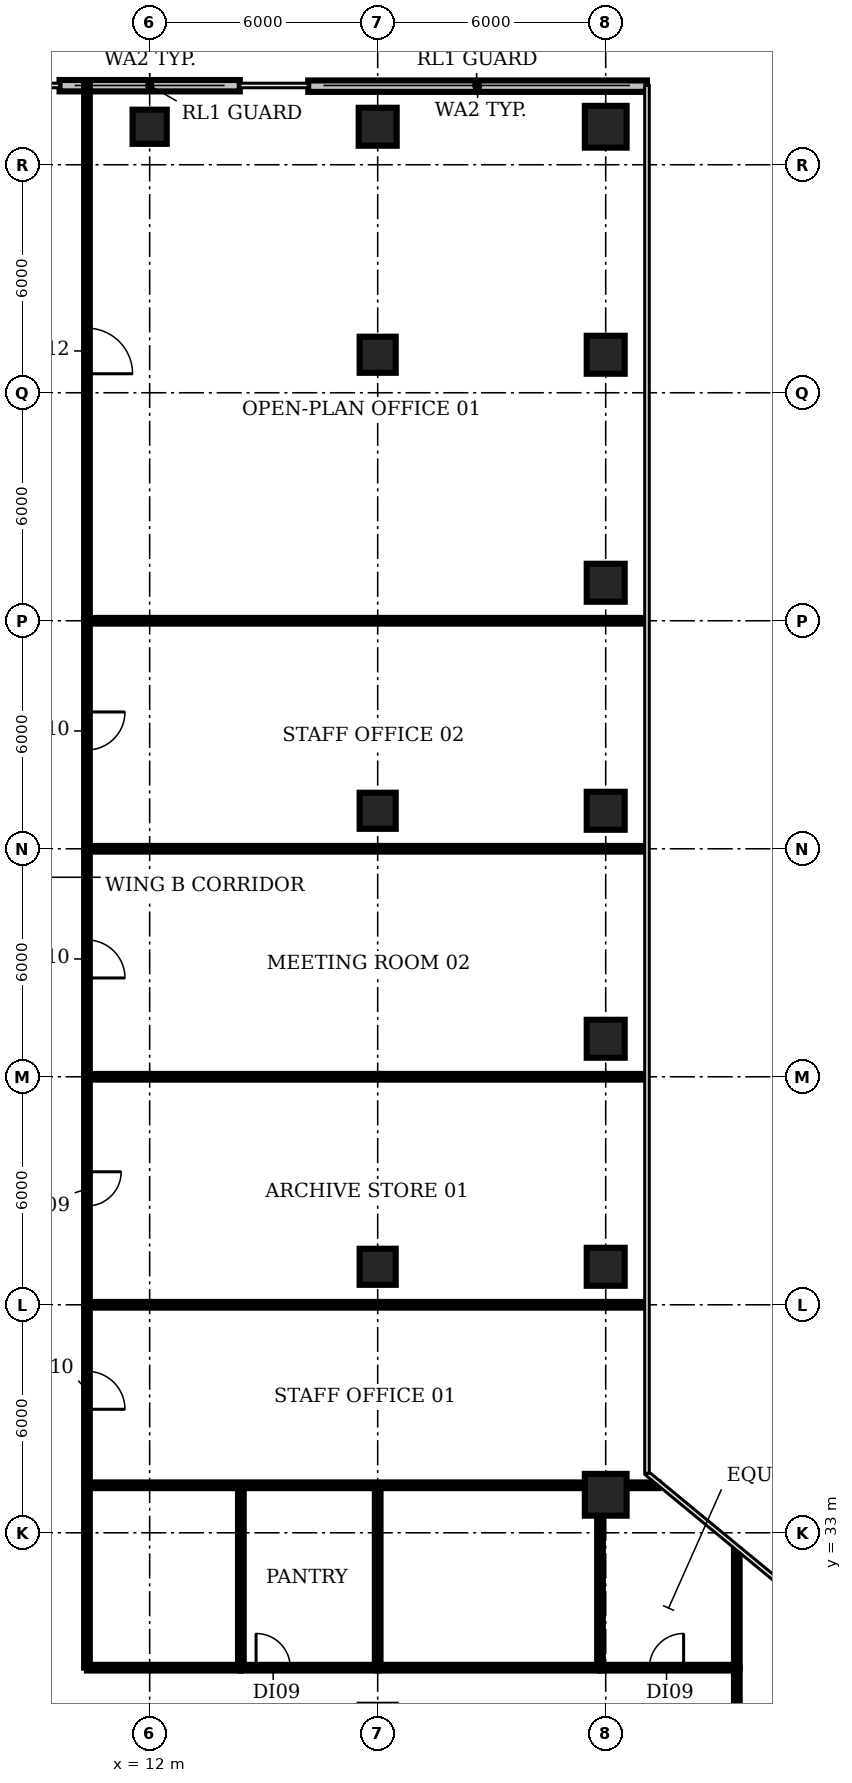
"""IFC4 building model, lengths in metres.
Left out: names, types, materials, properties, quantities, classifications, styles, units other than length and angle.
Written with IfcOpenShell. Run it as: python <this file> out.ifc"""

import sys

from ifc_helpers import new_model, si_unit, direction, frame, frame_2d, origin, origin_2d, place, context, subcontext, project, spatial, rectangle, circle, extrude, element, fill, save


model = new_model("IFC4")
c1 = context("Model", 3, precision=1e-05, world=origin(), true_north=direction((0.0, 1.0)))
c2 = subcontext(c1, "Body", "Model", "MODEL_VIEW")
j1 = project(units=[si_unit("LENGTHUNIT", "METRE"), si_unit("PLANEANGLEUNIT", "RADIAN")], contexts=[c1])
p1 = place(None, origin())
s1 = spatial("IfcSite", under=j1, at=p1, CompositionType="ELEMENT")
p2 = place(p1, origin())
s2 = spatial("IfcBuilding", under=s1, at=p2, CompositionType="ELEMENT")
p3 = place(p2, frame((0.0, 0.0, 87.8)))
s3 = spatial("IfcBuildingStorey", under=s2, at=p3, CompositionType="ELEMENT", Elevation=87.8)
p4 = place(p3, frame((12.0, 70.0, 0.0), z_axis=(0.0, 0.0, 1.0), x_axis=(1.0, 0.0, 0.0)))
e1 = element("IfcColumn", 1, at=p4, inside=s3, PredefinedType="COLUMN", context=c2, shape_type="SweptSolid", body=[
    extrude(rectangle(XDim=0.9, YDim=0.9, at=origin_2d()), origin(), (0.0, 0.0, 1.0), 3.85),
])
for number, where, z_axis, x_axis in (
    (2, (18.0, 40.0, -0.35), (0.0, 0.0, 1.0), (1.0, 0.0, 0.0)),
    (3, (18.0, 52.0, -0.35), (0.0, 0.0, 1.0), (1.0, 0.0, 0.0)),
    (4, (18.0, 64.0, -0.35), (0.0, 0.0, 1.0), (1.0, 0.0, 0.0)),
):
    element("IfcColumn", number, at=place(p3, frame(where, z_axis=z_axis, x_axis=x_axis)), inside=s3, PredefinedType="COLUMN", context=c2, shape_type="SweptSolid", body=[
        extrude(rectangle(XDim=0.95, YDim=0.95, at=origin_2d()), origin(), (0.0, 0.0, 1.0), 4.2),
    ])
p5 = place(p3, frame((18.0, 70.0, -0.35), z_axis=(0.0, 0.0, 1.0), x_axis=(1.0, 0.0, 0.0)))
e5 = element("IfcColumn", 5, at=p5, inside=s3, PredefinedType="COLUMN", context=c2, shape_type="SweptSolid", body=[
    extrude(rectangle(XDim=1.0, YDim=1.0, at=origin_2d()), origin(), (0.0, 0.0, 1.0), 4.2),
])
p6 = place(p3, frame((24.0, 34.0, -0.35), z_axis=(0.0, 0.0, 1.0), x_axis=(1.0, 0.0, 0.0)))
e6 = element("IfcColumn", 6, at=p6, inside=s3, PredefinedType="COLUMN", context=c2, shape_type="SweptSolid", body=[
    extrude(circle(Radius=0.55, at=origin_2d()), origin(), (0.0, 0.0, 1.0), 4.2),
])
for number, where, z_axis, x_axis in (
    (7, (24.0, 40.0, -0.35), (0.0, 0.0, 1.0), (1.0, 0.0, 0.0)),
    (8, (24.0, 46.0, -0.35), (0.0, 0.0, 1.0), (1.0, 0.0, 0.0)),
    (9, (24.0, 52.0, -0.35), (0.0, 0.0, 1.0), (1.0, 0.0, 0.0)),
    (10, (24.0, 58.0, -0.35), (0.0, 0.0, 1.0), (1.0, 0.0, 0.0)),
    (11, (24.0, 64.0, -0.35), (0.0, 0.0, 1.0), (1.0, 0.0, 0.0)),
):
    element("IfcColumn", number, at=place(p3, frame(where, z_axis=z_axis, x_axis=x_axis)), inside=s3, PredefinedType="COLUMN", context=c2, shape_type="SweptSolid", body=[
        extrude(rectangle(XDim=1.0, YDim=1.0, at=origin_2d()), origin(), (0.0, 0.0, 1.0), 4.2),
    ])
p7 = place(p3, frame((24.0, 70.0, -0.35), z_axis=(0.0, 0.0, 1.0), x_axis=(1.0, 0.0, 0.0)))
e12 = element("IfcColumn", 12, at=p7, inside=s3, PredefinedType="COLUMN", context=c2, shape_type="SweptSolid", body=[
    extrude(circle(Radius=0.55, at=origin_2d()), origin(), (0.0, 0.0, 1.0), 4.2),
])
p8 = place(p3, frame((25.086, 71.068, 0.0), z_axis=(0.0, 0.0, 1.0), x_axis=(-1.0, 0.0, 0.0)))
e13 = element("IfcWall", 13, at=p8, inside=s3, PredefinedType="SOLIDWALL", context=c2, shape_type="SweptSolid", body=[
    extrude(rectangle(XDim=8.915, YDim=0.3, at=frame_2d((4.457, 0.0))), origin(), (0.0, 0.0, 1.0), 3.85),
])
p9 = place(p3, frame((14.372, 71.08, 0.0), z_axis=(0.0, 0.0, 1.0), x_axis=(-1.0, 0.0, 0.0)))
e14 = element("IfcWall", 14, at=p9, inside=s3, PredefinedType="SOLIDWALL", context=c2, shape_type="SweptSolid", body=[
    extrude(rectangle(XDim=4.743, YDim=0.3, at=frame_2d((2.372, 0.0))), origin(), (0.0, 0.0, 1.0), 3.85),
])
p10 = place(p3, frame((10.35, 29.45, 0.0), z_axis=(0.0, 0.0, 1.0), x_axis=(0.0, 1.0, 0.0)))
e15 = element("IfcWall", 15, at=p10, inside=s3, PredefinedType="PARTITIONING", context=c2, shape_type="SweptSolid", body=[
    extrude(rectangle(XDim=4.8, YDim=0.15, at=frame_2d((2.4, 0.0))), origin(), (0.0, 0.0, 1.0), 2.83),
])
p11 = place(p3, frame((10.35, 29.45, 0.0), z_axis=(0.0, 0.0, 1.0), x_axis=(1.0, 0.0, 0.0)))
e16 = element("IfcWall", 16, at=p11, inside=s3, PredefinedType="PARTITIONING", context=c2, shape_type="SweptSolid", body=[
    extrude(rectangle(XDim=4.05, YDim=0.15, at=frame_2d((2.025, 0.0))), origin(), (0.0, 0.0, 1.0), 2.83),
])
p12 = place(p3, frame((10.35, 34.25, 0.0), z_axis=(0.0, 0.0, 1.0), x_axis=(1.0, 0.0, 0.0)))
e17 = element("IfcWall", 17, at=p12, inside=s3, PredefinedType="PARTITIONING", context=c2, shape_type="SweptSolid", body=[
    extrude(rectangle(XDim=15.04, YDim=0.15, at=frame_2d((7.52, 0.0))), origin(), (0.0, 0.0, 1.0), 2.83),
])
p13 = place(p3, frame((10.35, 39.0, 0.0), z_axis=(0.0, 0.0, 1.0), x_axis=(0.0, -1.0, 0.0)))
e18 = element("IfcWall", 18, at=p13, inside=s3, PredefinedType="PARTITIONING", context=c2, shape_type="SweptSolid", body=[
    extrude(rectangle(XDim=4.75, YDim=0.15, at=frame_2d((2.375, 0.0))), origin(), (0.0, 0.0, 1.0), 2.83),
])
p14 = place(p13, frame((1.75, 0.0, 0.0)))
e19 = element("IfcOpeningElement", 19, at=p14, cuts=e18, PredefinedType="OPENING", context=c2, shape_type="SweptSolid", body=[
    extrude(rectangle(XDim=1.0, YDim=2.1, at=frame_2d((0.5, 1.05))), frame((0.0, 0.085, 0.0), z_axis=(0.0, -1.0, 0.0), x_axis=(1.0, 0.0, 0.0)), (0.0, 0.0, 1.0), 0.17),
])
p15 = place(p3, frame((10.35, 39.0, 0.0), z_axis=(0.0, 0.0, 1.0), x_axis=(1.0, 0.0, 0.0)))
e20 = element("IfcWall", 20, at=p15, inside=s3, PredefinedType="PARTITIONING", context=c2, shape_type="SweptSolid", body=[
    extrude(rectangle(XDim=14.69, YDim=0.15, at=frame_2d((7.345, 0.0))), origin(), (0.0, 0.0, 1.0), 2.83),
])
p16 = place(p3, frame((10.35, 45.0, 0.0), z_axis=(0.0, 0.0, 1.0), x_axis=(0.0, -1.0, 0.0)))
e21 = element("IfcWall", 21, at=p16, inside=s3, PredefinedType="PARTITIONING", context=c2, shape_type="SweptSolid", body=[
    extrude(rectangle(XDim=6.0, YDim=0.15, at=frame_2d((3.0, 0.0))), origin(), (0.0, 0.0, 1.0), 2.83),
])
p17 = place(p16, frame((2.5, 0.0, 0.0)))
e22 = element("IfcOpeningElement", 22, at=p17, cuts=e21, PredefinedType="OPENING", context=c2, shape_type="SweptSolid", body=[
    extrude(rectangle(XDim=0.9, YDim=2.1, at=frame_2d((0.45, 1.05))), frame((0.0, 0.085, 0.0), z_axis=(0.0, -1.0, 0.0), x_axis=(1.0, 0.0, 0.0)), (0.0, 0.0, 1.0), 0.17),
])
p18 = place(p3, frame((10.35, 45.0, 0.0), z_axis=(0.0, 0.0, 1.0), x_axis=(1.0, 0.0, 0.0)))
e23 = element("IfcWall", 23, at=p18, inside=s3, PredefinedType="PARTITIONING", context=c2, shape_type="SweptSolid", body=[
    extrude(rectangle(XDim=14.69, YDim=0.15, at=frame_2d((7.345, 0.0))), origin(), (0.0, 0.0, 1.0), 2.83),
])
p19 = place(p3, frame((10.35, 51.0, 0.0), z_axis=(0.0, 0.0, 1.0), x_axis=(0.0, -1.0, 0.0)))
e24 = element("IfcWall", 24, at=p19, inside=s3, PredefinedType="PARTITIONING", context=c2, shape_type="SweptSolid", body=[
    extrude(rectangle(XDim=6.0, YDim=0.15, at=frame_2d((3.0, 0.0))), origin(), (0.0, 0.0, 1.0), 2.83),
])
p20 = place(p19, frame((2.4, 0.0, 0.0)))
e25 = element("IfcOpeningElement", 25, at=p20, cuts=e24, PredefinedType="OPENING", context=c2, shape_type="SweptSolid", body=[
    extrude(rectangle(XDim=1.0, YDim=2.1, at=frame_2d((0.5, 1.05))), frame((0.0, 0.085, 0.0), z_axis=(0.0, -1.0, 0.0), x_axis=(1.0, 0.0, 0.0)), (0.0, 0.0, 1.0), 0.17),
])
p21 = place(p3, frame((10.35, 51.0, 0.0), z_axis=(0.0, 0.0, 1.0), x_axis=(1.0, 0.0, 0.0)))
e26 = element("IfcWall", 26, at=p21, inside=s3, PredefinedType="PARTITIONING", context=c2, shape_type="SweptSolid", body=[
    extrude(rectangle(XDim=14.69, YDim=0.15, at=frame_2d((7.345, 0.0))), origin(), (0.0, 0.0, 1.0), 2.83),
])
p22 = place(p3, frame((10.35, 57.0, 0.0), z_axis=(0.0, 0.0, 1.0), x_axis=(0.0, -1.0, 0.0)))
e27 = element("IfcWall", 27, at=p22, inside=s3, PredefinedType="PARTITIONING", context=c2, shape_type="SweptSolid", body=[
    extrude(rectangle(XDim=6.0, YDim=0.15, at=frame_2d((3.0, 0.0))), origin(), (0.0, 0.0, 1.0), 2.83),
])
p23 = place(p22, frame((2.4, 0.0, 0.0)))
e28 = element("IfcOpeningElement", 28, at=p23, cuts=e27, PredefinedType="OPENING", context=c2, shape_type="SweptSolid", body=[
    extrude(rectangle(XDim=1.0, YDim=2.1, at=frame_2d((0.5, 1.05))), frame((0.0, 0.085, 0.0), z_axis=(0.0, -1.0, 0.0), x_axis=(1.0, 0.0, 0.0)), (0.0, 0.0, 1.0), 0.17),
])
p24 = place(p3, frame((10.35, 57.0, 0.0), z_axis=(0.0, 0.0, 1.0), x_axis=(1.0, 0.0, 0.0)))
e29 = element("IfcWall", 29, at=p24, inside=s3, PredefinedType="PARTITIONING", context=c2, shape_type="SweptSolid", body=[
    extrude(rectangle(XDim=14.69, YDim=0.15, at=frame_2d((7.345, 0.0))), origin(), (0.0, 0.0, 1.0), 2.83),
])
p25 = place(p3, frame((10.35, 71.146, 0.0), z_axis=(0.0, 0.0, 1.0), x_axis=(0.0, -1.0, 0.0)))
e30 = element("IfcWall", 30, at=p25, inside=s3, PredefinedType="PARTITIONING", context=c2, shape_type="SweptSolid", body=[
    extrude(rectangle(XDim=14.146, YDim=0.15, at=frame_2d((7.073, 0.0))), origin(), (0.0, 0.0, 1.0), 2.83),
])
p26 = place(p25, frame((6.446, 0.0, 0.0)))
e31 = element("IfcOpeningElement", 31, at=p26, cuts=e30, PredefinedType="OPENING", context=c2, shape_type="SweptSolid", body=[
    extrude(rectangle(XDim=1.2, YDim=2.1, at=frame_2d((0.6, 1.05))), frame((0.0, 0.085, 0.0), z_axis=(0.0, -1.0, 0.0), x_axis=(1.0, 0.0, 0.0)), (0.0, 0.0, 1.0), 0.17),
])
p27 = place(p3, frame((14.4, 29.45, 0.0), z_axis=(0.0, 0.0, 1.0), x_axis=(0.0, 1.0, 0.0)))
e32 = element("IfcWall", 32, at=p27, inside=s3, PredefinedType="PARTITIONING", context=c2, shape_type="SweptSolid", body=[
    extrude(rectangle(XDim=4.8, YDim=0.15, at=frame_2d((2.4, 0.0))), origin(), (0.0, 0.0, 1.0), 2.83),
])
p28 = place(p3, frame((14.4, 29.45, 0.0), z_axis=(0.0, 0.0, 1.0), x_axis=(1.0, 0.0, 0.0)))
e33 = element("IfcWall", 33, at=p28, inside=s3, PredefinedType="PARTITIONING", context=c2, shape_type="SweptSolid", body=[
    extrude(rectangle(XDim=3.6, YDim=0.15, at=frame_2d((1.8, 0.0))), origin(), (0.0, 0.0, 1.0), 2.83),
])
p29 = place(p28, frame((0.4, 0.0, 0.0)))
e34 = element("IfcOpeningElement", 34, at=p29, cuts=e33, PredefinedType="OPENING", context=c2, shape_type="SweptSolid", body=[
    extrude(rectangle(XDim=0.9, YDim=2.1, at=frame_2d((0.45, 1.05))), frame((0.0, 0.085, 0.0), z_axis=(0.0, -1.0, 0.0), x_axis=(1.0, 0.0, 0.0)), (0.0, 0.0, 1.0), 0.17),
])
p30 = place(p3, frame((18.0, 29.45, 0.0), z_axis=(0.0, 0.0, 1.0), x_axis=(0.0, 1.0, 0.0)))
e35 = element("IfcWall", 35, at=p30, inside=s3, PredefinedType="PARTITIONING", context=c2, shape_type="SweptSolid", body=[
    extrude(rectangle(XDim=4.8, YDim=0.15, at=frame_2d((2.4, 0.0))), origin(), (0.0, 0.0, 1.0), 2.83),
])
p31 = place(p3, frame((18.0, 29.45, 0.0), z_axis=(0.0, 0.0, 1.0), x_axis=(1.0, 0.0, 0.0)))
e36 = element("IfcWall", 36, at=p31, inside=s3, PredefinedType="PARTITIONING", context=c2, shape_type="SweptSolid", body=[
    extrude(rectangle(XDim=5.85, YDim=0.15, at=frame_2d((2.925, 0.0))), origin(), (0.0, 0.0, 1.0), 2.83),
])
p32 = place(p3, frame((23.85, 29.45, 0.0), z_axis=(0.0, 0.0, 1.0), x_axis=(0.0, 1.0, 0.0)))
e37 = element("IfcWall", 37, at=p32, inside=s3, PredefinedType="PARTITIONING", context=c2, shape_type="SweptSolid", body=[
    extrude(rectangle(XDim=4.8, YDim=0.15, at=frame_2d((2.4, 0.0))), origin(), (0.0, 0.0, 1.0), 2.83),
])
p33 = place(p3, frame((23.85, 29.45, 0.0), z_axis=(0.0, 0.0, 1.0), x_axis=(1.0, 0.0, 0.0)))
e38 = element("IfcWall", 38, at=p33, inside=s3, PredefinedType="PARTITIONING", context=c2, shape_type="SweptSolid", body=[
    extrude(rectangle(XDim=3.6, YDim=0.15, at=frame_2d((1.8, 0.0))), origin(), (0.0, 0.0, 1.0), 2.83),
])
p34 = place(p33, frame((1.3, 0.0, 0.0)))
e39 = element("IfcOpeningElement", 39, at=p34, cuts=e38, PredefinedType="OPENING", context=c2, shape_type="SweptSolid", body=[
    extrude(rectangle(XDim=0.9, YDim=2.1, at=frame_2d((0.45, 1.05))), frame((0.0, 0.085, 0.0), z_axis=(0.0, -1.0, 0.0), x_axis=(1.0, 0.0, 0.0)), (0.0, 0.0, 1.0), 0.17),
])
p35 = place(p3, frame((27.45, 25.55, 0.0), z_axis=(0.0, 0.0, 1.0), x_axis=(0.0, 1.0, 0.0)))
e40 = element("IfcWall", 40, at=p35, inside=s3, PredefinedType="PARTITIONING", context=c2, shape_type="SweptSolid", body=[
    extrude(rectangle(XDim=3.9, YDim=0.15, at=frame_2d((1.95, 0.0))), origin(), (0.0, 0.0, 1.0), 2.83),
])
p36 = place(p3, frame((27.45, 29.45, 0.0), z_axis=(0.0, 0.0, 1.0), x_axis=(0.0, 1.0, 0.0)))
e41 = element("IfcWall", 41, at=p36, inside=s3, PredefinedType="PARTITIONING", context=c2, shape_type="SweptSolid", body=[
    extrude(rectangle(XDim=3.1, YDim=0.15, at=frame_2d((1.55, 0.0))), origin(), (0.0, 0.0, 1.0), 2.83),
])
p37 = place(p14, origin())
e42 = element("IfcDoor", 42, at=p37, inside=s3, OperationType="SINGLE_SWING_RIGHT", PredefinedType="DOOR", context=c2, shape_type="SweptSolid", body=[
    extrude(rectangle(XDim=1.0, YDim=2.1, at=frame_2d((0.5, 1.05))), frame((0.0, 0.025, 0.0), z_axis=(0.0, -1.0, 0.0), x_axis=(1.0, 0.0, 0.0)), (0.0, 0.0, 1.0), 0.05),
])
fill(e19, e42)
p38 = place(p17, origin())
e43 = element("IfcDoor", 43, at=p38, inside=s3, OperationType="SINGLE_SWING_LEFT", PredefinedType="DOOR", context=c2, shape_type="SweptSolid", body=[
    extrude(rectangle(XDim=0.9, YDim=2.1, at=frame_2d((0.45, 1.05))), frame((0.0, 0.025, 0.0), z_axis=(0.0, -1.0, 0.0), x_axis=(1.0, 0.0, 0.0)), (0.0, 0.0, 1.0), 0.05),
])
fill(e22, e43)
p39 = place(p20, origin())
e44 = element("IfcDoor", 44, at=p39, inside=s3, OperationType="SINGLE_SWING_RIGHT", PredefinedType="DOOR", context=c2, shape_type="SweptSolid", body=[
    extrude(rectangle(XDim=1.0, YDim=2.1, at=frame_2d((0.5, 1.05))), frame((0.0, 0.025, 0.0), z_axis=(0.0, -1.0, 0.0), x_axis=(1.0, 0.0, 0.0)), (0.0, 0.0, 1.0), 0.05),
])
fill(e25, e44)
p40 = place(p23, origin())
e45 = element("IfcDoor", 45, at=p40, inside=s3, OperationType="SINGLE_SWING_LEFT", PredefinedType="DOOR", context=c2, shape_type="SweptSolid", body=[
    extrude(rectangle(XDim=1.0, YDim=2.1, at=frame_2d((0.5, 1.05))), frame((0.0, 0.025, 0.0), z_axis=(0.0, -1.0, 0.0), x_axis=(1.0, 0.0, 0.0)), (0.0, 0.0, 1.0), 0.05),
])
fill(e28, e45)
p41 = place(p26, origin())
e46 = element("IfcDoor", 46, at=p41, inside=s3, OperationType="SINGLE_SWING_RIGHT", PredefinedType="DOOR", context=c2, shape_type="SweptSolid", body=[
    extrude(rectangle(XDim=1.2, YDim=2.1, at=frame_2d((0.6, 1.05))), frame((0.0, 0.025, 0.0), z_axis=(0.0, -1.0, 0.0), x_axis=(1.0, 0.0, 0.0)), (0.0, 0.0, 1.0), 0.05),
])
fill(e31, e46)
p42 = place(p29, origin())
e47 = element("IfcDoor", 47, at=p42, inside=s3, OperationType="SINGLE_SWING_LEFT", PredefinedType="DOOR", context=c2, shape_type="SweptSolid", body=[
    extrude(rectangle(XDim=0.9, YDim=2.1, at=frame_2d((0.45, 1.05))), frame((0.0, 0.025, 0.0), z_axis=(0.0, -1.0, 0.0), x_axis=(1.0, 0.0, 0.0)), (0.0, 0.0, 1.0), 0.05),
])
fill(e34, e47)
p43 = place(p34, origin())
e48 = element("IfcDoor", 48, at=p43, inside=s3, OperationType="SINGLE_SWING_RIGHT", PredefinedType="DOOR", context=c2, shape_type="SweptSolid", body=[
    extrude(rectangle(XDim=0.9, YDim=2.1, at=frame_2d((0.45, 1.05))), frame((0.0, 0.025, 0.0), z_axis=(0.0, -1.0, 0.0), x_axis=(1.0, 0.0, 0.0)), (0.0, 0.0, 1.0), 0.05),
])
fill(e39, e48)
save(model, sys.argv[1])
